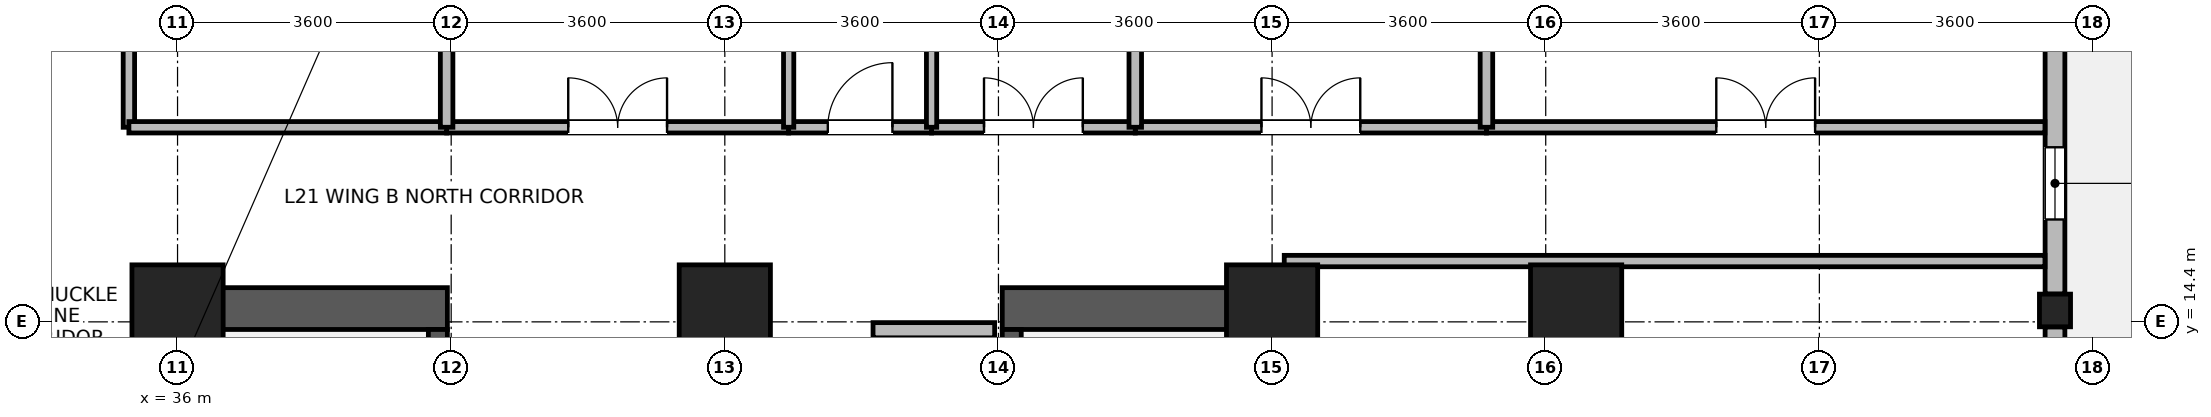
"""IFC4 building model, lengths in metres.
Left out: names, types, materials, properties, quantities, classifications, styles, units other than length and angle.
Written with IfcOpenShell. Run it as: python <this file> out.ifc"""

import sys

from ifc_helpers import new_model, si_unit, direction, frame, frame_2d, origin, origin_2d, place, context, subcontext, project, spatial, rectangle, i_section, extrude, source, transform, mapped, element, fill, save


model = new_model("IFC4")
c1 = context("Model", 3, precision=1e-05, world=origin(), true_north=direction((0.0, 1.0)))
c2 = subcontext(c1, "Body", "Model", "MODEL_VIEW")
j1 = project(units=[si_unit("LENGTHUNIT", "METRE"), si_unit("PLANEANGLEUNIT", "RADIAN")], contexts=[c1])
p1 = place(None, origin())
s1 = spatial("IfcSite", under=j1, at=p1, CompositionType="ELEMENT")
p2 = place(p1, origin())
s2 = spatial("IfcBuilding", under=s1, at=p2, CompositionType="ELEMENT")
p3 = place(p2, frame((0.0, 0.0, 86.0)))
s3 = spatial("IfcBuildingStorey", under=s2, at=p3, CompositionType="ELEMENT", Elevation=86.0)
for number, where, z_axis, x_axis in (
    (1, (36.075, 6.75, 0.0), (0.0, 0.0, 1.0), (0.0, 1.0, 0.0)),
    (2, (50.325, 6.75, 0.0), (0.0, 0.0, 1.0), (0.0, 1.0, 0.0)),
):
    element("IfcWall", number, at=place(p3, frame(where, z_axis=z_axis, x_axis=x_axis)), inside=s3, PredefinedType="SHEAR", context=c2, shape_type="SweptSolid", body=[
        extrude(rectangle(XDim=8.1, YDim=0.55, at=frame_2d((4.05, 0.0))), origin(), (0.0, 0.0, 1.0), 3.45),
    ])
for number, where, z_axis, x_axis in (
    (3, (36.35, 14.575, 0.0), (0.0, 0.0, 1.0), (1.0, 0.0, 0.0)),
    (4, (46.85, 14.575, 0.0), (0.0, 0.0, 1.0), (1.0, 0.0, 0.0)),
):
    element("IfcWall", number, at=place(p3, frame(where, z_axis=z_axis, x_axis=x_axis)), inside=s3, PredefinedType="SHEAR", context=c2, shape_type="SweptSolid", body=[
        extrude(rectangle(XDim=3.2, YDim=0.55, at=frame_2d((1.6, 0.0))), origin(), (0.0, 0.0, 1.0), 3.45),
    ])
p4 = place(p3, frame((39.425, 7.3, 0.0), z_axis=(0.0, 0.0, 1.0), x_axis=(0.0, 1.0, 0.0)))
e5 = element("IfcWall", 5, at=p4, inside=s3, PredefinedType="SHEAR", context=c2, shape_type="SweptSolid", body=[
    extrude(rectangle(XDim=7.0, YDim=0.25, at=frame_2d((3.5, 0.0))), origin(), (0.0, 0.0, 1.0), 3.45),
])
p5 = place(p4, frame((0.15, 0.0, 0.0)))
e6 = element("IfcOpeningElement", 6, at=p5, cuts=e5, PredefinedType="OPENING", context=c2, shape_type="SweptSolid", body=[
    extrude(rectangle(XDim=1.1, YDim=2.08, at=frame_2d((0.55, 1.04))), frame((0.0, 0.135, 0.0), z_axis=(0.0, -1.0, 0.0), x_axis=(1.0, 0.0, 0.0)), (0.0, 0.0, 1.0), 0.27),
])
p6 = place(p3, frame((46.975, 7.3, 0.0), z_axis=(0.0, 0.0, 1.0), x_axis=(0.0, 1.0, 0.0)))
e7 = element("IfcWall", 7, at=p6, inside=s3, PredefinedType="SHEAR", context=c2, shape_type="SweptSolid", body=[
    extrude(rectangle(XDim=7.0, YDim=0.25, at=frame_2d((3.5, 0.0))), origin(), (0.0, 0.0, 1.0), 3.45),
])
p7 = place(p6, frame((0.15, 0.0, 0.0)))
e8 = element("IfcOpeningElement", 8, at=p7, cuts=e7, PredefinedType="OPENING", context=c2, shape_type="SweptSolid", body=[
    extrude(rectangle(XDim=1.1, YDim=2.08, at=frame_2d((0.55, 1.04))), frame((0.0, 0.135, 0.0), z_axis=(0.0, -1.0, 0.0), x_axis=(1.0, 0.0, 0.0)), (0.0, 0.0, 1.0), 0.27),
])
m1 = source(origin(), c2, "Body", "SweptSolid", [
    extrude(rectangle(XDim=1.2, YDim=1.2, at=origin_2d()), origin(), (0.0, 0.0, 1.0), 3.7),
])
for number, where, z_axis, x_axis in (
    (9, (36.0, 14.55, 0.0), (0.0, 0.0, 1.0), (1.0, 0.0, 0.0)),
    (10, (43.2, 14.55, 0.0), (0.0, 0.0, 1.0), (1.0, 0.0, 0.0)),
    (11, (50.4, 14.55, 0.0), (0.0, 0.0, 1.0), (1.0, 0.0, 0.0)),
    (12, (54.4, 14.55, 0.0), (0.0, 0.0, 1.0), (1.0, 0.0, 0.0)),
):
    element("IfcColumn", number, at=place(p3, frame(where, z_axis=z_axis, x_axis=x_axis)), inside=s3, PredefinedType="COLUMN", context=c2, shape_type="MappedRepresentation", body=[
        mapped(m1, transform((0.0, 0.0, 0.0), x_axis=(1.0, 0.0, 0.0), y_axis=(0.0, 1.0, 0.0), z_axis=(0.0, 0.0, 1.0), scale=1.0)),
    ])
m2 = source(origin(), c2, "Body", "SweptSolid", [
    extrude(i_section(OverallWidth=0.409, OverallDepth=0.43, WebThickness=0.024, FlangeThickness=0.033, FilletRadius=0.015, at=origin_2d()), origin(), (0.0, 0.0, 1.0), 3.7),
])
p8 = place(p3, frame((60.7, 14.55, 0.0), z_axis=(0.0, 0.0, 1.0), x_axis=(1.0, 0.0, 0.0)))
e13 = element("IfcColumn", 13, at=p8, inside=s3, PredefinedType="COLUMN", context=c2, shape_type="MappedRepresentation", body=[
    mapped(m2, transform((0.0, 0.0, 0.0), x_axis=(1.0, 0.0, 0.0), y_axis=(0.0, 1.0, 0.0), z_axis=(0.0, 0.0, 1.0), scale=1.0)),
])
p9 = place(p3, frame((60.7, 14.334, 0.0), z_axis=(0.0, 0.0, 1.0), x_axis=(0.0, -1.0, 0.0)))
e14 = element("IfcWall", 14, at=p9, inside=s3, PredefinedType="STANDARD", context=c2, shape_type="SweptSolid", body=[
    extrude(rectangle(XDim=7.068, YDim=0.26, at=frame_2d((3.534, 0.0))), origin(), (0.0, 0.0, 1.0), 2.93),
])
p10 = place(p9, frame((0.867, 0.0, 0.85)))
e15 = element("IfcOpeningElement", 15, at=p10, cuts=e14, PredefinedType="OPENING", context=c2, shape_type="SweptSolid", body=[
    extrude(rectangle(XDim=1.8, YDim=1.85, at=frame_2d((0.9, 0.925))), frame((0.0, 0.14, 0.0), z_axis=(0.0, -1.0, 0.0), x_axis=(1.0, 0.0, 0.0)), (0.0, 0.0, 1.0), 0.28),
])
p11 = place(p9, frame((4.401, 0.0, 0.85)))
e16 = element("IfcOpeningElement", 16, at=p11, cuts=e14, PredefinedType="OPENING", context=c2, shape_type="SweptSolid", body=[
    extrude(rectangle(XDim=1.8, YDim=1.85, at=frame_2d((0.9, 0.925))), frame((0.0, 0.14, 0.0), z_axis=(0.0, -1.0, 0.0), x_axis=(1.0, 0.0, 0.0)), (0.0, 0.0, 1.0), 0.28),
])
p12 = place(p3, frame((60.7, 21.384, 0.0), z_axis=(0.0, 0.0, 1.0), x_axis=(0.0, -1.0, 0.0)))
e17 = element("IfcWall", 17, at=p12, inside=s3, PredefinedType="STANDARD", context=c2, shape_type="SweptSolid", body=[
    extrude(rectangle(XDim=6.618, YDim=0.26, at=frame_2d((3.309, 0.0))), origin(), (0.0, 0.0, 1.0), 2.93),
])
p13 = place(p12, frame((0.754, 0.0, 0.85)))
e18 = element("IfcOpeningElement", 18, at=p13, cuts=e17, PredefinedType="OPENING", context=c2, shape_type="SweptSolid", body=[
    extrude(rectangle(XDim=1.8, YDim=1.85, at=frame_2d((0.9, 0.925))), frame((0.0, 0.14, 0.0), z_axis=(0.0, -1.0, 0.0), x_axis=(1.0, 0.0, 0.0)), (0.0, 0.0, 1.0), 0.28),
])
p14 = place(p12, frame((4.687, 0.0, 0.85)))
e19 = element("IfcOpeningElement", 19, at=p14, cuts=e17, PredefinedType="OPENING", context=c2, shape_type="SweptSolid", body=[
    extrude(rectangle(XDim=0.95, YDim=1.75, at=frame_2d((0.475, 0.875))), frame((0.0, 0.14, 0.0), z_axis=(0.0, -1.0, 0.0), x_axis=(1.0, 0.0, 0.0)), (0.0, 0.0, 1.0), 0.28),
])
p15 = place(p3, frame((45.15, 14.29, 0.0), z_axis=(0.0, 0.0, 1.0), x_axis=(1.0, 0.0, 0.0)))
e20 = element("IfcWall", 20, at=p15, inside=s3, PredefinedType="PARTITIONING", context=c2, shape_type="SweptSolid", body=[
    extrude(rectangle(XDim=1.6, YDim=0.2, at=frame_2d((0.8, 0.0))), origin(), (0.0, 0.0, 1.0), 2.23),
])
p16 = place(p3, frame((50.56, 15.2, 0.0), z_axis=(0.0, 0.0, 1.0), x_axis=(1.0, 0.0, 0.0)))
e21 = element("IfcWall", 21, at=p16, inside=s3, PredefinedType="PARTITIONING", context=c2, shape_type="SweptSolid", body=[
    extrude(rectangle(XDim=10.008, YDim=0.15, at=frame_2d((5.004, 0.0))), origin(), (0.0, 0.0, 1.0), 3.43),
])
p17 = place(p3, frame((35.36, 16.96, 0.0), z_axis=(0.0, 0.0, 1.0), x_axis=(0.0, 1.0, 0.0)))
e22 = element("IfcWall", 22, at=p17, inside=s3, PredefinedType="PARTITIONING", context=c2, shape_type="SweptSolid", body=[
    extrude(rectangle(XDim=9.64, YDim=0.15, at=frame_2d((4.82, 0.0))), origin(), (0.0, 0.0, 1.0), 3.43),
])
p18 = place(p17, frame((2.435, 0.0, 0.0)))
e23 = element("IfcOpeningElement", 23, at=p18, cuts=e22, PredefinedType="OPENING", context=c2, shape_type="SweptSolid", body=[
    extrude(rectangle(XDim=1.3, YDim=2.12, at=frame_2d((0.65, 1.06))), frame((0.0, 0.085, 0.0), z_axis=(0.0, -1.0, 0.0), x_axis=(1.0, 0.0, 0.0)), (0.0, 0.0, 1.0), 0.17),
])
p19 = place(p3, frame((53.22, 16.96, 0.0), z_axis=(0.0, 0.0, 1.0), x_axis=(1.0, 0.0, 0.0)))
e24 = element("IfcWall", 24, at=p19, inside=s3, PredefinedType="PARTITIONING", context=c2, shape_type="SweptSolid", body=[
    extrude(rectangle(XDim=7.348, YDim=0.15, at=frame_2d((3.674, 0.0))), origin(), (0.0, 0.0, 1.0), 3.43),
])
p20 = place(p19, frame((3.024, 0.0, 0.0)))
e25 = element("IfcOpeningElement", 25, at=p20, cuts=e24, PredefinedType="OPENING", context=c2, shape_type="SweptSolid", body=[
    extrude(rectangle(XDim=1.3, YDim=2.12, at=frame_2d((0.65, 1.06))), frame((0.0, 0.085, 0.0), z_axis=(0.0, -1.0, 0.0), x_axis=(1.0, 0.0, 0.0)), (0.0, 0.0, 1.0), 0.17),
])
p21 = place(p3, frame((48.6, 16.96, 0.0), z_axis=(0.0, 0.0, 1.0), x_axis=(1.0, 0.0, 0.0)))
e26 = element("IfcWall", 26, at=p21, inside=s3, PredefinedType="PARTITIONING", context=c2, shape_type="SweptSolid", body=[
    extrude(rectangle(XDim=4.62, YDim=0.15, at=frame_2d((2.31, 0.0))), origin(), (0.0, 0.0, 1.0), 3.43),
])
p22 = place(p21, frame((1.66, 0.0, 0.0)))
e27 = element("IfcOpeningElement", 27, at=p22, cuts=e26, PredefinedType="OPENING", context=c2, shape_type="SweptSolid", body=[
    extrude(rectangle(XDim=1.3, YDim=2.12, at=frame_2d((0.65, 1.06))), frame((0.0, 0.085, 0.0), z_axis=(0.0, -1.0, 0.0), x_axis=(1.0, 0.0, 0.0)), (0.0, 0.0, 1.0), 0.17),
])
p23 = place(p3, frame((39.54, 16.96, 0.0), z_axis=(0.0, 0.0, 1.0), x_axis=(1.0, 0.0, 0.0)))
e28 = element("IfcWall", 28, at=p23, inside=s3, PredefinedType="PARTITIONING", context=c2, shape_type="SweptSolid", body=[
    extrude(rectangle(XDim=4.5, YDim=0.15, at=frame_2d((2.25, 0.0))), origin(), (0.0, 0.0, 1.0), 3.43),
])
p24 = place(p23, frame((1.6, 0.0, 0.0)))
e29 = element("IfcOpeningElement", 29, at=p24, cuts=e28, PredefinedType="OPENING", context=c2, shape_type="SweptSolid", body=[
    extrude(rectangle(XDim=1.3, YDim=2.12, at=frame_2d((0.65, 1.06))), frame((0.0, 0.085, 0.0), z_axis=(0.0, -1.0, 0.0), x_axis=(1.0, 0.0, 0.0)), (0.0, 0.0, 1.0), 0.17),
])
p25 = place(p3, frame((35.36, 16.96, 0.0), z_axis=(0.0, 0.0, 1.0), x_axis=(1.0, 0.0, 0.0)))
e30 = element("IfcWall", 30, at=p25, inside=s3, PredefinedType="PARTITIONING", context=c2, shape_type="SweptSolid", body=[
    extrude(rectangle(XDim=4.18, YDim=0.15, at=frame_2d((2.09, 0.0))), origin(), (0.0, 0.0, 1.0), 3.43),
])
p26 = place(p3, frame((45.92, 16.96, 0.0), z_axis=(0.0, 0.0, 1.0), x_axis=(1.0, 0.0, 0.0)))
e31 = element("IfcWall", 31, at=p26, inside=s3, PredefinedType="PARTITIONING", context=c2, shape_type="SweptSolid", body=[
    extrude(rectangle(XDim=2.68, YDim=0.15, at=frame_2d((1.34, 0.0))), origin(), (0.0, 0.0, 1.0), 3.43),
])
p27 = place(p26, frame((0.69, 0.0, 0.0)))
e32 = element("IfcOpeningElement", 32, at=p27, cuts=e31, PredefinedType="OPENING", context=c2, shape_type="SweptSolid", body=[
    extrude(rectangle(XDim=1.3, YDim=2.12, at=frame_2d((0.65, 1.06))), frame((0.0, 0.085, 0.0), z_axis=(0.0, -1.0, 0.0), x_axis=(1.0, 0.0, 0.0)), (0.0, 0.0, 1.0), 0.17),
])
p28 = place(p3, frame((44.04, 16.96, 0.0), z_axis=(0.0, 0.0, 1.0), x_axis=(1.0, 0.0, 0.0)))
e33 = element("IfcWall", 33, at=p28, inside=s3, PredefinedType="PARTITIONING", context=c2, shape_type="SweptSolid", body=[
    extrude(rectangle(XDim=1.88, YDim=0.15, at=frame_2d((0.94, 0.0))), origin(), (0.0, 0.0, 1.0), 3.43),
])
p29 = place(p28, frame((0.515, 0.0, 0.0)))
e34 = element("IfcOpeningElement", 34, at=p29, cuts=e33, PredefinedType="OPENING", context=c2, shape_type="SweptSolid", body=[
    extrude(rectangle(XDim=0.85, YDim=2.04, at=frame_2d((0.425, 1.02))), frame((0.0, 0.085, 0.0), z_axis=(0.0, -1.0, 0.0), x_axis=(1.0, 0.0, 0.0)), (0.0, 0.0, 1.0), 0.17),
])
p30 = place(p3, frame((39.54, 16.96, 0.0), z_axis=(0.0, 0.0, 1.0), x_axis=(0.0, 1.0, 0.0)))
e35 = element("IfcWall", 35, at=p30, inside=s3, PredefinedType="PARTITIONING", context=c2, shape_type="SweptSolid", body=[
    extrude(rectangle(XDim=9.64, YDim=0.165, at=frame_2d((4.82, 0.0))), origin(), (0.0, 0.0, 1.0), 3.43),
])
for number, where, z_axis, x_axis in (
    (36, (44.04, 16.96, 0.0), (0.0, 0.0, 1.0), (0.0, 1.0, 0.0)),
    (37, (45.92, 16.96, 0.0), (0.0, 0.0, 1.0), (0.0, 1.0, 0.0)),
):
    element("IfcWall", number, at=place(p3, frame(where, z_axis=z_axis, x_axis=x_axis)), inside=s3, PredefinedType="PARTITIONING", context=c2, shape_type="SweptSolid", body=[
        extrude(rectangle(XDim=9.64, YDim=0.135, at=frame_2d((4.82, 0.0))), origin(), (0.0, 0.0, 1.0), 3.43),
    ])
for number, where, z_axis, x_axis in (
    (38, (48.6, 16.96, 0.0), (0.0, 0.0, 1.0), (0.0, 1.0, 0.0)),
    (39, (53.22, 16.96, 0.0), (0.0, 0.0, 1.0), (0.0, 1.0, 0.0)),
):
    element("IfcWall", number, at=place(p3, frame(where, z_axis=z_axis, x_axis=x_axis)), inside=s3, PredefinedType="PARTITIONING", context=c2, shape_type="SweptSolid", body=[
        extrude(rectangle(XDim=9.64, YDim=0.165, at=frame_2d((4.82, 0.0))), origin(), (0.0, 0.0, 1.0), 3.43),
    ])
p31 = place(p14, origin())
e40 = element("IfcWindow", 40, at=p31, inside=s3, PartitioningType="SINGLE_PANEL", PredefinedType="WINDOW", context=c2, shape_type="SweptSolid", body=[
    extrude(rectangle(XDim=0.95, YDim=1.75, at=frame_2d((0.475, 0.875))), frame((0.0, 0.03, 0.0), z_axis=(0.0, -1.0, 0.0), x_axis=(1.0, 0.0, 0.0)), (0.0, 0.0, 1.0), 0.06),
])
fill(e19, e40)
p32 = place(p20, origin())
e41 = element("IfcDoor", 41, at=p32, inside=s3, OperationType="DOUBLE_DOOR_SINGLE_SWING", PredefinedType="DOOR", context=c2, shape_type="SweptSolid", body=[
    extrude(rectangle(XDim=1.3, YDim=2.12, at=frame_2d((0.65, 1.06))), frame((0.0, 0.025, 0.0), z_axis=(0.0, -1.0, 0.0), x_axis=(1.0, 0.0, 0.0)), (0.0, 0.0, 1.0), 0.05),
])
fill(e25, e41)
p33 = place(p22, origin())
e42 = element("IfcDoor", 42, at=p33, inside=s3, OperationType="DOUBLE_DOOR_SINGLE_SWING", PredefinedType="DOOR", context=c2, shape_type="SweptSolid", body=[
    extrude(rectangle(XDim=1.3, YDim=2.12, at=frame_2d((0.65, 1.06))), frame((0.0, 0.025, 0.0), z_axis=(0.0, -1.0, 0.0), x_axis=(1.0, 0.0, 0.0)), (0.0, 0.0, 1.0), 0.05),
])
fill(e27, e42)
p34 = place(p24, origin())
e43 = element("IfcDoor", 43, at=p34, inside=s3, OperationType="DOUBLE_DOOR_SINGLE_SWING", PredefinedType="DOOR", context=c2, shape_type="SweptSolid", body=[
    extrude(rectangle(XDim=1.3, YDim=2.12, at=frame_2d((0.65, 1.06))), frame((0.0, 0.025, 0.0), z_axis=(0.0, -1.0, 0.0), x_axis=(1.0, 0.0, 0.0)), (0.0, 0.0, 1.0), 0.05),
])
fill(e29, e43)
p35 = place(p27, origin())
e44 = element("IfcDoor", 44, at=p35, inside=s3, OperationType="DOUBLE_DOOR_SINGLE_SWING", PredefinedType="DOOR", context=c2, shape_type="SweptSolid", body=[
    extrude(rectangle(XDim=1.3, YDim=2.12, at=frame_2d((0.65, 1.06))), frame((0.0, 0.025, 0.0), z_axis=(0.0, -1.0, 0.0), x_axis=(1.0, 0.0, 0.0)), (0.0, 0.0, 1.0), 0.05),
])
fill(e32, e44)
p36 = place(p29, origin())
e45 = element("IfcDoor", 45, at=p36, inside=s3, OperationType="SINGLE_SWING_RIGHT", PredefinedType="DOOR", context=c2, shape_type="SweptSolid", body=[
    extrude(rectangle(XDim=0.85, YDim=2.04, at=frame_2d((0.425, 1.02))), frame((0.0, 0.025, 0.0), z_axis=(0.0, -1.0, 0.0), x_axis=(1.0, 0.0, 0.0)), (0.0, 0.0, 1.0), 0.05),
])
fill(e34, e45)
save(model, sys.argv[1])
